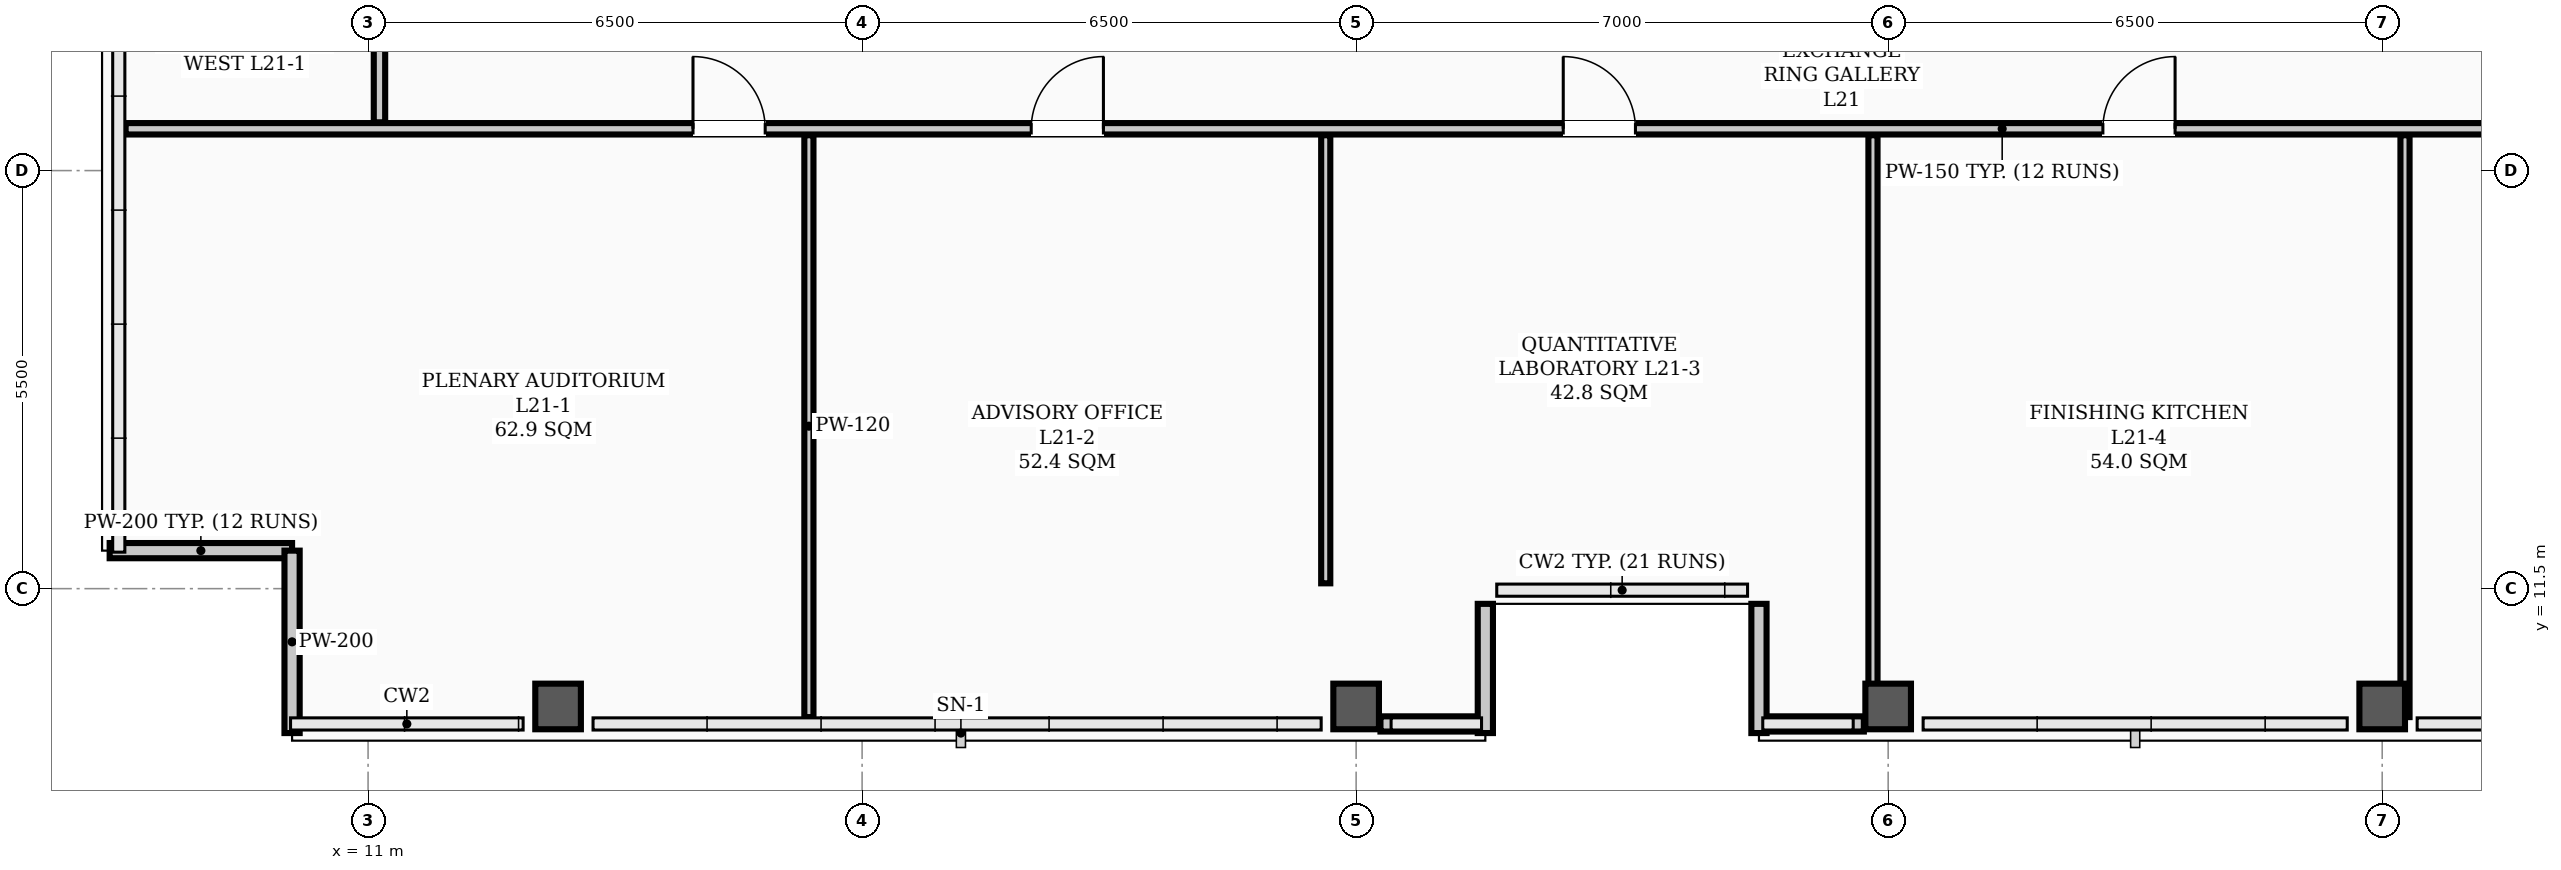
"""IFC4 building model, lengths in metres.
Left out: names, types, materials, properties, quantities, classifications, styles, units other than length and angle.
Written with IfcOpenShell. Run it as: python <this file> out.ifc"""

import sys

from ifc_helpers import new_model, si_unit, direction, frame, frame_2d, origin, origin_2d, place, context, subcontext, project, spatial, rectangle, hollow_rectangle, extrude, element, fill, save


model = new_model("IFC4")
c1 = context("Model", 3, precision=1e-05, world=origin(), true_north=direction((0.0, 1.0)))
c2 = subcontext(c1, "Body", "Model", "MODEL_VIEW")
j1 = project(units=[si_unit("LENGTHUNIT", "METRE"), si_unit("PLANEANGLEUNIT", "RADIAN")], contexts=[c1])
p1 = place(None, origin())
s1 = spatial("IfcSite", under=j1, at=p1, CompositionType="ELEMENT")
p2 = place(p1, origin())
s2 = spatial("IfcBuilding", under=s1, at=p2, CompositionType="ELEMENT")
p3 = place(p2, frame((0.0, 0.0, 85.0)))
s3 = spatial("IfcBuildingStorey", under=s2, at=p3, CompositionType="ELEMENT", Elevation=85.0)
for number, where, z_axis, x_axis in (
    (1, (13.5, 9.95, 0.0), (0.0, 0.0, 1.0), (1.0, 0.0, 0.0)),
    (2, (24.0, 9.95, 0.0), (0.0, 0.0, 1.0), (1.0, 0.0, 0.0)),
    (3, (31.0, 9.95, 0.0), (0.0, 0.0, 1.0), (1.0, 0.0, 0.0)),
    (4, (37.5, 9.95, 0.0), (0.0, 0.0, 1.0), (1.0, 0.0, 0.0)),
):
    element("IfcColumn", number, at=place(p3, frame(where, z_axis=z_axis, x_axis=x_axis)), inside=s3, PredefinedType="COLUMN", context=c2, shape_type="SweptSolid", body=[
        extrude(hollow_rectangle(XDim=0.6, YDim=0.6, WallThickness=0.026, InnerFilletRadius=0.013, OuterFilletRadius=0.039, at=origin_2d()), origin(), (0.0, 0.0, 1.0), 3.9),
    ])
for number, where, z_axis, x_axis in (
    (5, (24.32, 9.72, 0.0), (0.0, 0.0, 1.0), (1.0, 0.0, 0.0)),
    (6, (29.35, 9.72, 0.0), (0.0, 0.0, 1.0), (1.0, 0.0, 0.0)),
):
    element("IfcWall", number, at=place(p3, frame(where, z_axis=z_axis, x_axis=x_axis)), inside=s3, PredefinedType="PARAPET", context=c2, shape_type="SweptSolid", body=[
        extrude(rectangle(XDim=1.33, YDim=0.2, at=frame_2d((0.665, 0.0))), origin(), (0.0, 0.0, 1.0), 1.2),
    ])
for number, where, z_axis, x_axis in (
    (7, (7.6, 12.0, 0.0), (0.0, 0.0, 1.0), (1.0, 0.0, 0.0)),
    (8, (10.0, 12.0, 0.0), (0.0, 0.0, 1.0), (0.0, -1.0, 0.0)),
):
    element("IfcWall", number, at=place(p3, frame(where, z_axis=z_axis, x_axis=x_axis)), inside=s3, PredefinedType="PARAPET", context=c2, shape_type="SweptSolid", body=[
        extrude(rectangle(XDim=2.4, YDim=0.2, at=frame_2d((1.2, 0.0))), origin(), (0.0, 0.0, 1.0), 1.2),
    ])
for number, where, z_axis, x_axis in (
    (9, (25.7, 9.6, 0.0), (0.0, 0.0, 1.0), (0.0, 1.0, 0.0)),
    (10, (29.3, 11.3, 0.0), (0.0, 0.0, 1.0), (0.0, -1.0, 0.0)),
):
    element("IfcWall", number, at=place(p3, frame(where, z_axis=z_axis, x_axis=x_axis)), inside=s3, PredefinedType="PARAPET", context=c2, shape_type="SweptSolid", body=[
        extrude(rectangle(XDim=1.7, YDim=0.2, at=frame_2d((0.85, 0.0))), origin(), (0.0, 0.0, 1.0), 1.2),
    ])
p4 = place(p3, frame((7.81, 17.55, 0.0), z_axis=(0.0, 0.0, 1.0), x_axis=(1.0, 0.0, 0.0)))
e11 = element("IfcWall", 11, at=p4, inside=s3, PredefinedType="PARTITIONING", context=c2, shape_type="SweptSolid", body=[
    extrude(rectangle(XDim=49.38, YDim=0.15, at=frame_2d((24.69, 0.0))), origin(), (0.0, 0.0, 1.0), 3.1),
])
p5 = place(p4, frame((7.465, 0.0, 0.0)))
e12 = element("IfcOpeningElement", 12, at=p5, cuts=e11, PredefinedType="OPENING", context=c2, shape_type="SweptSolid", body=[
    extrude(rectangle(XDim=0.95, YDim=2.08, at=frame_2d((0.475, 1.04))), frame((0.0, 0.085, 0.0), z_axis=(0.0, -1.0, 0.0), x_axis=(1.0, 0.0, 0.0)), (0.0, 0.0, 1.0), 0.17),
])
p6 = place(p4, frame((11.915, 0.0, 0.0)))
e13 = element("IfcOpeningElement", 13, at=p6, cuts=e11, PredefinedType="OPENING", context=c2, shape_type="SweptSolid", body=[
    extrude(rectangle(XDim=0.95, YDim=2.08, at=frame_2d((0.475, 1.04))), frame((0.0, 0.085, 0.0), z_axis=(0.0, -1.0, 0.0), x_axis=(1.0, 0.0, 0.0)), (0.0, 0.0, 1.0), 0.17),
])
p7 = place(p4, frame((18.915, 0.0, 0.0)))
e14 = element("IfcOpeningElement", 14, at=p7, cuts=e11, PredefinedType="OPENING", context=c2, shape_type="SweptSolid", body=[
    extrude(rectangle(XDim=0.95, YDim=2.08, at=frame_2d((0.475, 1.04))), frame((0.0, 0.085, 0.0), z_axis=(0.0, -1.0, 0.0), x_axis=(1.0, 0.0, 0.0)), (0.0, 0.0, 1.0), 0.17),
])
p8 = place(p4, frame((26.015, 0.0, 0.0)))
e15 = element("IfcOpeningElement", 15, at=p8, cuts=e11, PredefinedType="OPENING", context=c2, shape_type="SweptSolid", body=[
    extrude(rectangle(XDim=0.95, YDim=2.08, at=frame_2d((0.475, 1.04))), frame((0.0, 0.085, 0.0), z_axis=(0.0, -1.0, 0.0), x_axis=(1.0, 0.0, 0.0)), (0.0, 0.0, 1.0), 0.17),
])
p9 = place(p4, frame((32.815, 0.0, 0.0)))
e16 = element("IfcOpeningElement", 16, at=p9, cuts=e11, PredefinedType="OPENING", context=c2, shape_type="SweptSolid", body=[
    extrude(rectangle(XDim=0.95, YDim=2.08, at=frame_2d((0.475, 1.04))), frame((0.0, 0.085, 0.0), z_axis=(0.0, -1.0, 0.0), x_axis=(1.0, 0.0, 0.0)), (0.0, 0.0, 1.0), 0.17),
])
p10 = place(p4, frame((37.09, 0.0, 0.0)))
e17 = element("IfcOpeningElement", 17, at=p10, cuts=e11, PredefinedType="OPENING", context=c2, shape_type="SweptSolid", body=[
    extrude(rectangle(XDim=0.95, YDim=2.08, at=frame_2d((0.475, 1.04))), frame((0.0, 0.085, 0.0), z_axis=(0.0, -1.0, 0.0), x_axis=(1.0, 0.0, 0.0)), (0.0, 0.0, 1.0), 0.17),
])
p11 = place(p3, frame((11.15, 17.635, 0.0), z_axis=(0.0, 0.0, 1.0), x_axis=(0.0, 1.0, 0.0)))
e18 = element("IfcWall", 18, at=p11, inside=s3, PredefinedType="PARTITIONING", context=c2, shape_type="SweptSolid", body=[
    extrude(rectangle(XDim=20.58, YDim=0.15, at=frame_2d((10.29, 0.0))), origin(), (0.0, 0.0, 1.0), 3.0),
])
p12 = place(p11, frame((3.365, 0.0, 0.0)))
e19 = element("IfcOpeningElement", 19, at=p12, cuts=e18, PredefinedType="OPENING", context=c2, shape_type="SweptSolid", body=[
    extrude(rectangle(XDim=0.95, YDim=2.08, at=frame_2d((0.475, 1.04))), frame((0.0, 0.085, 0.0), z_axis=(0.0, -1.0, 0.0), x_axis=(1.0, 0.0, 0.0)), (0.0, 0.0, 1.0), 0.17),
])
p13 = place(p11, frame((8.49, 0.0, 0.0)))
e20 = element("IfcOpeningElement", 20, at=p13, cuts=e18, PredefinedType="OPENING", context=c2, shape_type="SweptSolid", body=[
    extrude(rectangle(XDim=0.95, YDim=2.08, at=frame_2d((0.475, 1.04))), frame((0.0, 0.085, 0.0), z_axis=(0.0, -1.0, 0.0), x_axis=(1.0, 0.0, 0.0)), (0.0, 0.0, 1.0), 0.17),
])
p14 = place(p11, frame((16.44, 0.0, 0.0)))
e21 = element("IfcOpeningElement", 21, at=p14, cuts=e18, PredefinedType="OPENING", context=c2, shape_type="SweptSolid", body=[
    extrude(rectangle(XDim=0.95, YDim=2.08, at=frame_2d((0.475, 1.04))), frame((0.0, 0.085, 0.0), z_axis=(0.0, -1.0, 0.0), x_axis=(1.0, 0.0, 0.0)), (0.0, 0.0, 1.0), 0.17),
])
p15 = place(p3, frame((16.8, 9.81, 0.0), z_axis=(0.0, 0.0, 1.0), x_axis=(0.0, 1.0, 0.0)))
e22 = element("IfcWall", 22, at=p15, inside=s3, PredefinedType="PARTITIONING", context=c2, shape_type="SweptSolid", body=[
    extrude(rectangle(XDim=7.655, YDim=0.12, at=frame_2d((3.828, 0.0))), origin(), (0.0, 0.0, 1.0), 3.212),
])
p16 = place(p3, frame((23.6, 11.57, 0.0), z_axis=(0.0, 0.0, 1.0), x_axis=(0.0, 1.0, 0.0)))
e23 = element("IfcWall", 23, at=p16, inside=s3, PredefinedType="PARTITIONING", context=c2, shape_type="SweptSolid", body=[
    extrude(rectangle(XDim=5.895, YDim=0.12, at=frame_2d((2.948, 0.0))), origin(), (0.0, 0.0, 1.0), 3.1),
])
for number, where, z_axis, x_axis in (
    (24, (30.8, 9.81, 0.0), (0.0, 0.0, 1.0), (0.0, 1.0, 0.0)),
    (25, (37.8, 9.81, 0.0), (0.0, 0.0, 1.0), (0.0, 1.0, 0.0)),
):
    element("IfcWall", number, at=place(p3, frame(where, z_axis=z_axis, x_axis=x_axis)), inside=s3, PredefinedType="PARTITIONING", context=c2, shape_type="SweptSolid", body=[
        extrude(rectangle(XDim=7.655, YDim=0.12, at=frame_2d((3.828, 0.0))), origin(), (0.0, 0.0, 1.0), 3.1),
    ])
p17 = place(p5, origin())
e26 = element("IfcDoor", 26, at=p17, inside=s3, OperationType="SINGLE_SWING_LEFT", PredefinedType="DOOR", context=c2, shape_type="SweptSolid", body=[
    extrude(rectangle(XDim=0.95, YDim=2.08, at=frame_2d((0.475, 1.04))), frame((0.0, 0.025, 0.0), z_axis=(0.0, -1.0, 0.0), x_axis=(1.0, 0.0, 0.0)), (0.0, 0.0, 1.0), 0.05),
])
fill(e12, e26)
p18 = place(p6, origin())
e27 = element("IfcDoor", 27, at=p18, inside=s3, OperationType="SINGLE_SWING_RIGHT", PredefinedType="DOOR", context=c2, shape_type="SweptSolid", body=[
    extrude(rectangle(XDim=0.95, YDim=2.08, at=frame_2d((0.475, 1.04))), frame((0.0, 0.025, 0.0), z_axis=(0.0, -1.0, 0.0), x_axis=(1.0, 0.0, 0.0)), (0.0, 0.0, 1.0), 0.05),
])
fill(e13, e27)
p19 = place(p7, origin())
e28 = element("IfcDoor", 28, at=p19, inside=s3, OperationType="SINGLE_SWING_LEFT", PredefinedType="DOOR", context=c2, shape_type="SweptSolid", body=[
    extrude(rectangle(XDim=0.95, YDim=2.08, at=frame_2d((0.475, 1.04))), frame((0.0, 0.025, 0.0), z_axis=(0.0, -1.0, 0.0), x_axis=(1.0, 0.0, 0.0)), (0.0, 0.0, 1.0), 0.05),
])
fill(e14, e28)
p20 = place(p8, origin())
e29 = element("IfcDoor", 29, at=p20, inside=s3, OperationType="SINGLE_SWING_RIGHT", PredefinedType="DOOR", context=c2, shape_type="SweptSolid", body=[
    extrude(rectangle(XDim=0.95, YDim=2.08, at=frame_2d((0.475, 1.04))), frame((0.0, 0.025, 0.0), z_axis=(0.0, -1.0, 0.0), x_axis=(1.0, 0.0, 0.0)), (0.0, 0.0, 1.0), 0.05),
])
fill(e15, e29)
save(model, sys.argv[1])
